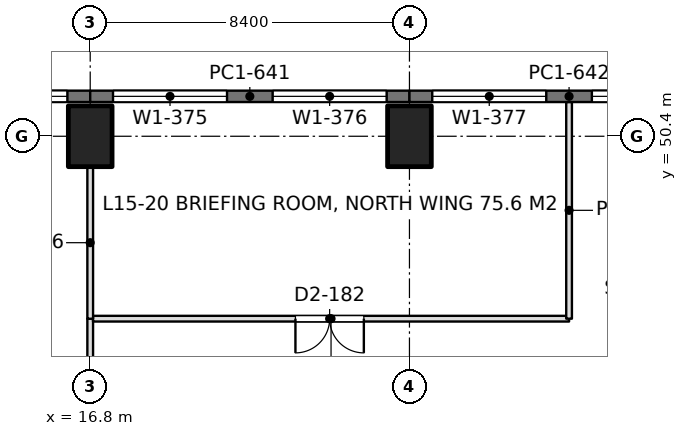
"""IFC4 building model, lengths in metres.
Left out: names, types, materials, properties, quantities, classifications, styles, units other than length and angle.
Written with IfcOpenShell. Run it as: python <this file> out.ifc"""

import sys

from ifc_helpers import new_model, si_unit, direction, frame, frame_2d, origin, origin_2d, place, context, subcontext, project, spatial, rectangle, extrude, element, fill, save


model = new_model("IFC4")
c1 = context("Model", 3, precision=1e-05, world=origin(), true_north=direction((0.0, 1.0)))
c2 = subcontext(c1, "Body", "Model", "MODEL_VIEW")
j1 = project(units=[si_unit("LENGTHUNIT", "METRE"), si_unit("PLANEANGLEUNIT", "RADIAN")], contexts=[c1])
p1 = place(None, origin())
s1 = spatial("IfcSite", under=j1, at=p1, CompositionType="ELEMENT")
p2 = place(p1, origin())
s2 = spatial("IfcBuilding", under=s1, at=p2, CompositionType="ELEMENT")
p3 = place(p2, frame((0.0, 0.0, 68.4)))
s3 = spatial("IfcBuildingStorey", under=s2, at=p3, CompositionType="ELEMENT", Elevation=68.4)
for number, where, z_axis, x_axis in (
    (1, (16.8, 50.4, 0.0), (0.0, 0.0, 1.0), (1.0, 0.0, 0.0)),
    (2, (25.2, 50.4, 0.0), (0.0, 0.0, 1.0), (1.0, 0.0, 0.0)),
):
    element("IfcColumn", number, at=place(p3, frame(where, z_axis=z_axis, x_axis=x_axis)), inside=s3, PredefinedType="COLUMN", context=c2, shape_type="SweptSolid", body=[
        extrude(rectangle(XDim=1.15, YDim=1.6, at=origin_2d()), origin(), (0.0, 0.0, 1.0), 4.5),
    ])
p4 = place(p3, frame((8.4, 51.45, 0.0), z_axis=(0.0, 0.0, 1.0), x_axis=(1.0, 0.0, 0.0)))
e3 = element("IfcWall", 3, at=p4, inside=s3, PredefinedType="SOLIDWALL", context=c2, shape_type="SweptSolid", body=[
    extrude(rectangle(XDim=8.4, YDim=0.3, at=frame_2d((4.2, 0.0))), origin(), (0.0, 0.0, 1.0), 4.34),
])
p5 = place(p4, frame((0.6, 0.0, 0.9)))
e4 = element("IfcOpeningElement", 4, at=p5, cuts=e3, PredefinedType="OPENING", context=c2, shape_type="SweptSolid", body=[
    extrude(rectangle(XDim=3.0, YDim=1.9, at=frame_2d((1.5, 0.95))), frame((0.0, 0.16, 0.0), z_axis=(0.0, -1.0, 0.0), x_axis=(1.0, 0.0, 0.0)), (0.0, 0.0, 1.0), 0.32),
])
p6 = place(p4, frame((4.8, 0.0, 0.9)))
e5 = element("IfcOpeningElement", 5, at=p6, cuts=e3, PredefinedType="OPENING", context=c2, shape_type="SweptSolid", body=[
    extrude(rectangle(XDim=3.0, YDim=1.9, at=frame_2d((1.5, 0.95))), frame((0.0, 0.16, 0.0), z_axis=(0.0, -1.0, 0.0), x_axis=(1.0, 0.0, 0.0)), (0.0, 0.0, 1.0), 0.32),
])
p7 = place(p3, frame((16.8, 51.45, 0.0), z_axis=(0.0, 0.0, 1.0), x_axis=(1.0, 0.0, 0.0)))
e6 = element("IfcWall", 6, at=p7, inside=s3, PredefinedType="SOLIDWALL", context=c2, shape_type="SweptSolid", body=[
    extrude(rectangle(XDim=8.4, YDim=0.3, at=frame_2d((4.2, 0.0))), origin(), (0.0, 0.0, 1.0), 4.34),
])
p8 = place(p7, frame((0.6, 0.0, 0.9)))
e7 = element("IfcOpeningElement", 7, at=p8, cuts=e6, PredefinedType="OPENING", context=c2, shape_type="SweptSolid", body=[
    extrude(rectangle(XDim=3.0, YDim=1.9, at=frame_2d((1.5, 0.95))), frame((0.0, 0.16, 0.0), z_axis=(0.0, -1.0, 0.0), x_axis=(1.0, 0.0, 0.0)), (0.0, 0.0, 1.0), 0.32),
])
p9 = place(p7, frame((4.8, 0.0, 0.9)))
e8 = element("IfcOpeningElement", 8, at=p9, cuts=e6, PredefinedType="OPENING", context=c2, shape_type="SweptSolid", body=[
    extrude(rectangle(XDim=3.0, YDim=1.9, at=frame_2d((1.5, 0.95))), frame((0.0, 0.16, 0.0), z_axis=(0.0, -1.0, 0.0), x_axis=(1.0, 0.0, 0.0)), (0.0, 0.0, 1.0), 0.32),
])
p10 = place(p3, frame((25.2, 51.45, 0.0), z_axis=(0.0, 0.0, 1.0), x_axis=(1.0, 0.0, 0.0)))
e9 = element("IfcWall", 9, at=p10, inside=s3, PredefinedType="SOLIDWALL", context=c2, shape_type="SweptSolid", body=[
    extrude(rectangle(XDim=8.4, YDim=0.3, at=frame_2d((4.2, 0.0))), origin(), (0.0, 0.0, 1.0), 4.34),
])
p11 = place(p10, frame((0.6, 0.0, 0.9)))
e10 = element("IfcOpeningElement", 10, at=p11, cuts=e9, PredefinedType="OPENING", context=c2, shape_type="SweptSolid", body=[
    extrude(rectangle(XDim=3.0, YDim=1.9, at=frame_2d((1.5, 0.95))), frame((0.0, 0.16, 0.0), z_axis=(0.0, -1.0, 0.0), x_axis=(1.0, 0.0, 0.0)), (0.0, 0.0, 1.0), 0.32),
])
p12 = place(p10, frame((4.8, 0.0, 0.9)))
e11 = element("IfcOpeningElement", 11, at=p12, cuts=e9, PredefinedType="OPENING", context=c2, shape_type="SweptSolid", body=[
    extrude(rectangle(XDim=3.0, YDim=1.9, at=frame_2d((1.5, 0.95))), frame((0.0, 0.16, 0.0), z_axis=(0.0, -1.0, 0.0), x_axis=(1.0, 0.0, 0.0)), (0.0, 0.0, 1.0), 0.32),
])
p13 = place(p3, frame((16.874, 45.6, 0.0), z_axis=(0.0, 0.0, 1.0), x_axis=(1.0, 0.0, 0.0)))
e12 = element("IfcWall", 12, at=p13, inside=s3, PredefinedType="PARTITIONING", context=c2, shape_type="SweptSolid", body=[
    extrude(rectangle(XDim=12.526, YDim=0.15, at=frame_2d((6.263, 0.0))), origin(), (0.0, 0.0, 1.0), 3.74),
])
p14 = place(p13, frame((5.326, 0.0, 0.0)))
e13 = element("IfcOpeningElement", 13, at=p14, cuts=e12, PredefinedType="OPENING", context=c2, shape_type="SweptSolid", body=[
    extrude(rectangle(XDim=1.8, YDim=2.2, at=frame_2d((0.9, 1.1))), frame((0.0, 0.085, 0.0), z_axis=(0.0, -1.0, 0.0), x_axis=(1.0, 0.0, 0.0)), (0.0, 0.0, 1.0), 0.17),
])
p15 = place(p3, frame((16.8, 45.598, 0.0), z_axis=(0.0, 0.0, 1.0), x_axis=(0.0, 1.0, 0.0)))
e14 = element("IfcWall", 14, at=p15, inside=s3, PredefinedType="PARTITIONING", context=c2, shape_type="SweptSolid", body=[
    extrude(rectangle(XDim=4.003, YDim=0.15, at=frame_2d((2.001, 0.0))), origin(), (0.0, 0.0, 1.0), 3.74),
])
p16 = place(p3, frame((29.4, 45.6, 0.0), z_axis=(0.0, 0.0, 1.0), x_axis=(0.0, 1.0, 0.0)))
e15 = element("IfcWall", 15, at=p16, inside=s3, PredefinedType="PARTITIONING", context=c2, shape_type="SweptSolid", body=[
    extrude(rectangle(XDim=5.702, YDim=0.15, at=frame_2d((2.851, 0.0))), origin(), (0.0, 0.0, 1.0), 3.84),
])
p17 = place(p3, frame((16.8, 42.899, 0.0), z_axis=(0.0, 0.0, 1.0), x_axis=(0.0, 1.0, 0.0)))
e16 = element("IfcWall", 16, at=p17, inside=s3, PredefinedType="PARTITIONING", context=c2, shape_type="SweptSolid", body=[
    extrude(rectangle(XDim=2.703, YDim=0.15, at=frame_2d((1.352, 0.0))), origin(), (0.0, 0.0, 1.0), 3.74),
])
p18 = place(p6, origin())
e17 = element("IfcWindow", 17, at=p18, inside=s3, PartitioningType="SINGLE_PANEL", PredefinedType="WINDOW", context=c2, shape_type="SweptSolid", body=[
    extrude(rectangle(XDim=3.0, YDim=1.9, at=frame_2d((1.5, 0.95))), frame((0.0, 0.03, 0.0), z_axis=(0.0, -1.0, 0.0), x_axis=(1.0, 0.0, 0.0)), (0.0, 0.0, 1.0), 0.06),
])
fill(e5, e17)
p19 = place(p8, origin())
e18 = element("IfcWindow", 18, at=p19, inside=s3, PartitioningType="SINGLE_PANEL", PredefinedType="WINDOW", context=c2, shape_type="SweptSolid", body=[
    extrude(rectangle(XDim=3.0, YDim=1.9, at=frame_2d((1.5, 0.95))), frame((0.0, 0.03, 0.0), z_axis=(0.0, -1.0, 0.0), x_axis=(1.0, 0.0, 0.0)), (0.0, 0.0, 1.0), 0.06),
])
fill(e7, e18)
p20 = place(p9, origin())
e19 = element("IfcWindow", 19, at=p20, inside=s3, PartitioningType="SINGLE_PANEL", PredefinedType="WINDOW", context=c2, shape_type="SweptSolid", body=[
    extrude(rectangle(XDim=3.0, YDim=1.9, at=frame_2d((1.5, 0.95))), frame((0.0, 0.03, 0.0), z_axis=(0.0, -1.0, 0.0), x_axis=(1.0, 0.0, 0.0)), (0.0, 0.0, 1.0), 0.06),
])
fill(e8, e19)
p21 = place(p11, origin())
e20 = element("IfcWindow", 20, at=p21, inside=s3, PartitioningType="SINGLE_PANEL", PredefinedType="WINDOW", context=c2, shape_type="SweptSolid", body=[
    extrude(rectangle(XDim=3.0, YDim=1.9, at=frame_2d((1.5, 0.95))), frame((0.0, 0.03, 0.0), z_axis=(0.0, -1.0, 0.0), x_axis=(1.0, 0.0, 0.0)), (0.0, 0.0, 1.0), 0.06),
])
fill(e10, e20)
p22 = place(p12, origin())
e21 = element("IfcWindow", 21, at=p22, inside=s3, PartitioningType="SINGLE_PANEL", PredefinedType="WINDOW", context=c2, shape_type="SweptSolid", body=[
    extrude(rectangle(XDim=3.0, YDim=1.9, at=frame_2d((1.5, 0.95))), frame((0.0, 0.03, 0.0), z_axis=(0.0, -1.0, 0.0), x_axis=(1.0, 0.0, 0.0)), (0.0, 0.0, 1.0), 0.06),
])
fill(e11, e21)
p23 = place(p14, frame((1.8, 0.0, 0.0), z_axis=(0.0, 0.0, 1.0), x_axis=(-1.0, 0.0, 0.0)))
e22 = element("IfcDoor", 22, at=p23, inside=s3, OperationType="DOUBLE_DOOR_SINGLE_SWING", PredefinedType="DOOR", context=c2, shape_type="SweptSolid", body=[
    extrude(rectangle(XDim=1.8, YDim=2.2, at=frame_2d((0.9, 1.1))), frame((0.0, 0.025, 0.0), z_axis=(0.0, -1.0, 0.0), x_axis=(1.0, 0.0, 0.0)), (0.0, 0.0, 1.0), 0.05),
])
fill(e13, e22)
save(model, sys.argv[1])
